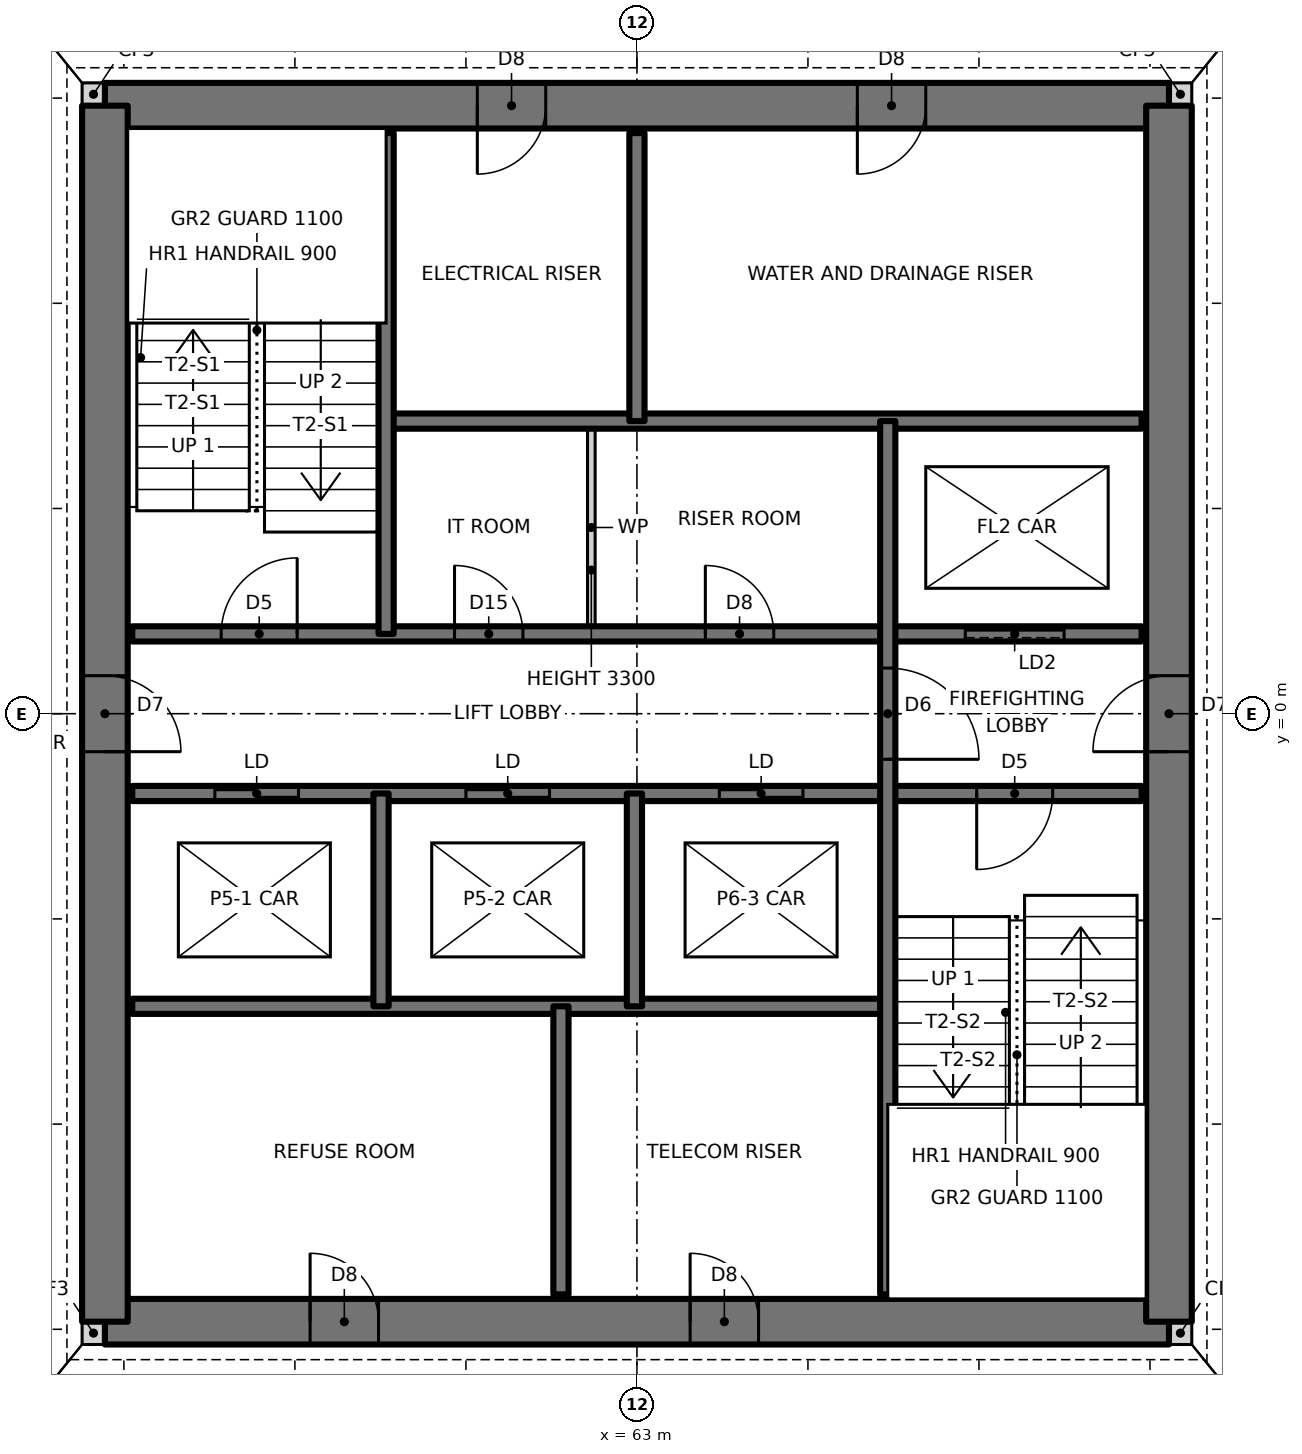
"""IFC4 building model, lengths in metres.
Left out: names, types, materials, properties, quantities, classifications, styles, units other than length and angle.
Written with IfcOpenShell. Run it as: python <this file> out.ifc"""

import sys

from ifc_helpers import new_model, si_unit, direction, frame, frame_2d, origin, place, context, subcontext, project, spatial, rectangle, extrude, element, fill, save


model = new_model("IFC4")
c1 = context("Model", 3, precision=1e-05, world=origin(), true_north=direction((0.0, 1.0)))
c2 = subcontext(c1, "Body", "Model", "MODEL_VIEW")
j1 = project(units=[si_unit("LENGTHUNIT", "METRE"), si_unit("PLANEANGLEUNIT", "RADIAN")], contexts=[c1])
p1 = place(None, origin())
s1 = spatial("IfcSite", under=j1, at=p1, CompositionType="ELEMENT")
p2 = place(p1, origin())
s2 = spatial("IfcBuilding", under=s1, at=p2, CompositionType="ELEMENT")
p3 = place(p2, frame((0.0, 0.0, 105.0)))
s3 = spatial("IfcBuildingStorey", under=s2, at=p3, CompositionType="ELEMENT", Elevation=105.0)
for number, where, z_axis, x_axis in (
    (1, (55.7, -8.15, 0.0), (0.0, 0.0, 1.0), (1.0, 0.0, 0.0)),
    (2, (70.0, -8.15, 0.0), (0.0, 0.0, 1.0), (1.0, 0.0, 0.0)),
    (3, (70.0, 8.15, 0.0), (0.0, 0.0, 1.0), (1.0, 0.0, 0.0)),
    (4, (55.7, 8.15, 0.0), (0.0, 0.0, 1.0), (1.0, 0.0, 0.0)),
):
    element("IfcWall", number, at=place(p3, frame(where, z_axis=z_axis, x_axis=x_axis)), inside=s3, PredefinedType="SOLIDWALL", context=c2, shape_type="SweptSolid", body=[
        extrude(rectangle(XDim=0.3, YDim=0.3, at=frame_2d((0.15, 0.0))), origin(), (0.0, 0.0, 1.0), 3.5),
    ])
p4 = place(p3, frame((56.0, -8.0, 0.0), z_axis=(0.0, 0.0, 1.0), x_axis=(1.0, 0.0, 0.0)))
e5 = element("IfcWall", 5, at=p4, inside=s3, PredefinedType="SHEAR", context=c2, shape_type="SweptSolid", body=[
    extrude(rectangle(XDim=14.0, YDim=0.6, at=frame_2d((7.0, 0.0))), origin(), (0.0, 0.0, 1.0), 3.5),
])
p5 = place(p4, frame((2.7, 0.0, 0.0)))
e6 = element("IfcOpeningElement", 6, at=p5, cuts=e5, PredefinedType="OPENING", context=c2, shape_type="SweptSolid", body=[
    extrude(rectangle(XDim=0.9, YDim=2.1, at=frame_2d((0.45, 1.05))), frame((0.0, 0.31, 0.0), z_axis=(0.0, -1.0, 0.0), x_axis=(1.0, 0.0, 0.0)), (0.0, 0.0, 1.0), 0.62),
])
p6 = place(p4, frame((7.7, 0.0, 0.0)))
e7 = element("IfcOpeningElement", 7, at=p6, cuts=e5, PredefinedType="OPENING", context=c2, shape_type="SweptSolid", body=[
    extrude(rectangle(XDim=0.9, YDim=2.1, at=frame_2d((0.45, 1.05))), frame((0.0, 0.31, 0.0), z_axis=(0.0, -1.0, 0.0), x_axis=(1.0, 0.0, 0.0)), (0.0, 0.0, 1.0), 0.62),
])
p7 = place(p3, frame((70.0, 8.0, 0.0), z_axis=(0.0, 0.0, 1.0), x_axis=(-1.0, 0.0, 0.0)))
e8 = element("IfcWall", 8, at=p7, inside=s3, PredefinedType="SHEAR", context=c2, shape_type="SweptSolid", body=[
    extrude(rectangle(XDim=14.0, YDim=0.6, at=frame_2d((7.0, 0.0))), origin(), (0.0, 0.0, 1.0), 3.5),
])
p8 = place(p7, frame((8.2, 0.0, 0.0)))
e9 = element("IfcOpeningElement", 9, at=p8, cuts=e8, PredefinedType="OPENING", context=c2, shape_type="SweptSolid", body=[
    extrude(rectangle(XDim=0.9, YDim=2.1, at=frame_2d((0.45, 1.05))), frame((0.0, 0.31, 0.0), z_axis=(0.0, -1.0, 0.0), x_axis=(1.0, 0.0, 0.0)), (0.0, 0.0, 1.0), 0.62),
])
p9 = place(p7, frame((3.2, 0.0, 0.0)))
e10 = element("IfcOpeningElement", 10, at=p9, cuts=e8, PredefinedType="OPENING", context=c2, shape_type="SweptSolid", body=[
    extrude(rectangle(XDim=0.9, YDim=2.1, at=frame_2d((0.45, 1.05))), frame((0.0, 0.31, 0.0), z_axis=(0.0, -1.0, 0.0), x_axis=(1.0, 0.0, 0.0)), (0.0, 0.0, 1.0), 0.62),
])
p10 = place(p3, frame((70.0, -8.0, 0.0), z_axis=(0.0, 0.0, 1.0), x_axis=(0.0, 1.0, 0.0)))
e11 = element("IfcWall", 11, at=p10, inside=s3, PredefinedType="SHEAR", context=c2, shape_type="SweptSolid", body=[
    extrude(rectangle(XDim=16.0, YDim=0.6, at=frame_2d((8.0, 0.0))), origin(), (0.0, 0.0, 1.0), 3.5),
])
p11 = place(p10, frame((7.5, 0.0, 0.0)))
e12 = element("IfcOpeningElement", 12, at=p11, cuts=e11, PredefinedType="OPENING", context=c2, shape_type="SweptSolid", body=[
    extrude(rectangle(XDim=1.0, YDim=2.1, at=frame_2d((0.5, 1.05))), frame((0.0, 0.31, 0.0), z_axis=(0.0, -1.0, 0.0), x_axis=(1.0, 0.0, 0.0)), (0.0, 0.0, 1.0), 0.62),
])
p12 = place(p3, frame((56.0, 8.0, 0.0), z_axis=(0.0, 0.0, 1.0), x_axis=(0.0, -1.0, 0.0)))
e13 = element("IfcWall", 13, at=p12, inside=s3, PredefinedType="SHEAR", context=c2, shape_type="SweptSolid", body=[
    extrude(rectangle(XDim=16.0, YDim=0.6, at=frame_2d((8.0, 0.0))), origin(), (0.0, 0.0, 1.0), 3.5),
])
p13 = place(p12, frame((7.5, 0.0, 0.0)))
e14 = element("IfcOpeningElement", 14, at=p13, cuts=e13, PredefinedType="OPENING", context=c2, shape_type="SweptSolid", body=[
    extrude(rectangle(XDim=1.0, YDim=2.1, at=frame_2d((0.5, 1.05))), frame((0.0, 0.31, 0.0), z_axis=(0.0, -1.0, 0.0), x_axis=(1.0, 0.0, 0.0)), (0.0, 0.0, 1.0), 0.62),
])
p14 = place(p3, frame((56.36, -3.85, 0.0), z_axis=(0.0, 0.0, 1.0), x_axis=(1.0, 0.0, 0.0)))
e15 = element("IfcWall", 15, at=p14, inside=s3, PredefinedType="SOLIDWALL", context=c2, shape_type="SweptSolid", body=[
    extrude(rectangle(XDim=9.94, YDim=0.2, at=frame_2d((4.97, 0.0))), origin(), (0.0, 0.0, 1.0), 3.5),
])
p15 = place(p3, frame((56.36, -1.05, 0.0), z_axis=(0.0, 0.0, 1.0), x_axis=(1.0, 0.0, 0.0)))
e16 = element("IfcWall", 16, at=p15, inside=s3, PredefinedType="SOLIDWALL", context=c2, shape_type="SweptSolid", body=[
    extrude(rectangle(XDim=13.28, YDim=0.2, at=frame_2d((6.64, 0.0))), origin(), (0.0, 0.0, 1.0), 3.5),
])
p16 = place(p15, frame((11.11, 0.0, 0.0)))
e17 = element("IfcOpeningElement", 17, at=p16, cuts=e16, PredefinedType="OPENING", context=c2, shape_type="SweptSolid", body=[
    extrude(rectangle(XDim=1.0, YDim=2.1, at=frame_2d((0.5, 1.05))), frame((0.0, 0.11, 0.0), z_axis=(0.0, -1.0, 0.0), x_axis=(1.0, 0.0, 0.0)), (0.0, 0.0, 1.0), 0.22),
])
p17 = place(p15, frame((1.087, 0.0, 0.0)))
e18 = element("IfcOpeningElement", 18, at=p17, cuts=e16, PredefinedType="OPENING", context=c2, shape_type="SweptSolid", body=[
    extrude(rectangle(XDim=1.1, YDim=2.1, at=frame_2d((0.55, 1.05))), frame((0.0, 0.11, 0.0), z_axis=(0.0, -1.0, 0.0), x_axis=(1.0, 0.0, 0.0)), (0.0, 0.0, 1.0), 0.22),
])
p18 = place(p15, frame((4.39, 0.0, 0.0)))
e19 = element("IfcOpeningElement", 19, at=p18, cuts=e16, PredefinedType="OPENING", context=c2, shape_type="SweptSolid", body=[
    extrude(rectangle(XDim=1.1, YDim=2.1, at=frame_2d((0.55, 1.05))), frame((0.0, 0.11, 0.0), z_axis=(0.0, -1.0, 0.0), x_axis=(1.0, 0.0, 0.0)), (0.0, 0.0, 1.0), 0.22),
])
p19 = place(p15, frame((7.724, 0.0, 0.0)))
e20 = element("IfcOpeningElement", 20, at=p19, cuts=e16, PredefinedType="OPENING", context=c2, shape_type="SweptSolid", body=[
    extrude(rectangle(XDim=1.1, YDim=2.1, at=frame_2d((0.55, 1.05))), frame((0.0, 0.11, 0.0), z_axis=(0.0, -1.0, 0.0), x_axis=(1.0, 0.0, 0.0)), (0.0, 0.0, 1.0), 0.22),
])
p20 = place(p3, frame((56.36, 1.05, 0.0), z_axis=(0.0, 0.0, 1.0), x_axis=(1.0, 0.0, 0.0)))
e21 = element("IfcWall", 21, at=p20, inside=s3, PredefinedType="SOLIDWALL", context=c2, shape_type="SweptSolid", body=[
    extrude(rectangle(XDim=13.28, YDim=0.2, at=frame_2d((6.64, 0.0))), origin(), (0.0, 0.0, 1.0), 3.5),
])
p21 = place(p20, frame((1.17, 0.0, 0.0)))
e22 = element("IfcOpeningElement", 22, at=p21, cuts=e21, PredefinedType="OPENING", context=c2, shape_type="SweptSolid", body=[
    extrude(rectangle(XDim=1.0, YDim=2.1, at=frame_2d((0.5, 1.05))), frame((0.0, 0.11, 0.0), z_axis=(0.0, -1.0, 0.0), x_axis=(1.0, 0.0, 0.0)), (0.0, 0.0, 1.0), 0.22),
])
p22 = place(p20, frame((7.54, 0.0, 0.0)))
e23 = element("IfcOpeningElement", 23, at=p22, cuts=e21, PredefinedType="OPENING", context=c2, shape_type="SweptSolid", body=[
    extrude(rectangle(XDim=0.9, YDim=2.1, at=frame_2d((0.45, 1.05))), frame((0.0, 0.11, 0.0), z_axis=(0.0, -1.0, 0.0), x_axis=(1.0, 0.0, 0.0)), (0.0, 0.0, 1.0), 0.22),
])
p23 = place(p20, frame((4.24, 0.0, 0.0)))
e24 = element("IfcOpeningElement", 24, at=p23, cuts=e21, PredefinedType="OPENING", context=c2, shape_type="SweptSolid", body=[
    extrude(rectangle(XDim=0.9, YDim=2.1, at=frame_2d((0.45, 1.05))), frame((0.0, 0.11, 0.0), z_axis=(0.0, -1.0, 0.0), x_axis=(1.0, 0.0, 0.0)), (0.0, 0.0, 1.0), 0.22),
])
p24 = place(p20, frame((10.96, 0.0, 0.0)))
e25 = element("IfcOpeningElement", 25, at=p24, cuts=e21, PredefinedType="OPENING", context=c2, shape_type="SweptSolid", body=[
    extrude(rectangle(XDim=1.3, YDim=2.1, at=frame_2d((0.65, 1.05))), frame((0.0, 0.11, 0.0), z_axis=(0.0, -1.0, 0.0), x_axis=(1.0, 0.0, 0.0)), (0.0, 0.0, 1.0), 0.22),
])
p25 = place(p3, frame((59.7, 3.85, 0.0), z_axis=(0.0, 0.0, 1.0), x_axis=(1.0, 0.0, 0.0)))
e26 = element("IfcWall", 26, at=p25, inside=s3, PredefinedType="SOLIDWALL", context=c2, shape_type="SweptSolid", body=[
    extrude(rectangle(XDim=9.94, YDim=0.2, at=frame_2d((4.97, 0.0))), origin(), (0.0, 0.0, 1.0), 3.5),
])
p26 = place(p3, frame((66.3, -7.64, 0.0), z_axis=(0.0, 0.0, 1.0), x_axis=(0.0, 1.0, 0.0)))
e27 = element("IfcWall", 27, at=p26, inside=s3, PredefinedType="SOLIDWALL", context=c2, shape_type="SweptSolid", body=[
    extrude(rectangle(XDim=11.49, YDim=0.2, at=frame_2d((5.745, 0.0))), origin(), (0.0, 0.0, 1.0), 3.5),
])
p27 = place(p26, frame((7.04, 0.0, 0.0)))
e28 = element("IfcOpeningElement", 28, at=p27, cuts=e27, PredefinedType="OPENING", context=c2, shape_type="SweptSolid", body=[
    extrude(rectangle(XDim=1.2, YDim=2.1, at=frame_2d((0.6, 1.05))), frame((0.0, 0.11, 0.0), z_axis=(0.0, -1.0, 0.0), x_axis=(1.0, 0.0, 0.0)), (0.0, 0.0, 1.0), 0.22),
])
p28 = place(p3, frame((63.0, 3.85, 0.0), z_axis=(0.0, 0.0, 1.0), x_axis=(0.0, 1.0, 0.0)))
e29 = element("IfcWall", 29, at=p28, inside=s3, PredefinedType="SOLIDWALL", context=c2, shape_type="SweptSolid", body=[
    extrude(rectangle(XDim=3.79, YDim=0.2, at=frame_2d((1.895, 0.0))), origin(), (0.0, 0.0, 1.0), 3.5),
])
p29 = place(p3, frame((62.967, -3.85, 0.0), z_axis=(0.0, 0.0, 1.0), x_axis=(0.0, 1.0, 0.0)))
e30 = element("IfcWall", 30, at=p29, inside=s3, PredefinedType="SOLIDWALL", context=c2, shape_type="SweptSolid", body=[
    extrude(rectangle(XDim=2.8, YDim=0.2, at=frame_2d((1.4, 0.0))), origin(), (0.0, 0.0, 1.0), 3.5),
])
p30 = place(p3, frame((62.4, 1.05, 0.0), z_axis=(0.0, 0.0, 1.0), x_axis=(0.0, 1.0, 0.0)))
e31 = element("IfcWall", 31, at=p30, inside=s3, PredefinedType="PARTITIONING", context=c2, shape_type="SweptSolid", body=[
    extrude(rectangle(XDim=2.8, YDim=0.1, at=frame_2d((1.4, 0.0))), origin(), (0.0, 0.0, 1.0), 3.3),
])
p31 = place(p3, frame((62.0, -7.64, 0.0), z_axis=(0.0, 0.0, 1.0), x_axis=(0.0, 1.0, 0.0)))
e32 = element("IfcWall", 32, at=p31, inside=s3, PredefinedType="SOLIDWALL", context=c2, shape_type="SweptSolid", body=[
    extrude(rectangle(XDim=3.79, YDim=0.2, at=frame_2d((1.895, 0.0))), origin(), (0.0, 0.0, 1.0), 3.5),
])
p32 = place(p3, frame((59.7, 1.05, 0.0), z_axis=(0.0, 0.0, 1.0), x_axis=(0.0, 1.0, 0.0)))
e33 = element("IfcWall", 33, at=p32, inside=s3, PredefinedType="SOLIDWALL", context=c2, shape_type="SweptSolid", body=[
    extrude(rectangle(XDim=6.59, YDim=0.2, at=frame_2d((3.295, 0.0))), origin(), (0.0, 0.0, 1.0), 3.5),
])
p33 = place(p3, frame((59.633, -3.85, 0.0), z_axis=(0.0, 0.0, 1.0), x_axis=(0.0, 1.0, 0.0)))
e34 = element("IfcWall", 34, at=p33, inside=s3, PredefinedType="SOLIDWALL", context=c2, shape_type="SweptSolid", body=[
    extrude(rectangle(XDim=2.8, YDim=0.2, at=frame_2d((1.4, 0.0))), origin(), (0.0, 0.0, 1.0), 3.5),
])
p34 = place(p21, origin())
e35 = element("IfcDoor", 35, at=p34, inside=s3, OperationType="SINGLE_SWING_RIGHT", PredefinedType="DOOR", context=c2, shape_type="SweptSolid", body=[
    extrude(rectangle(XDim=1.0, YDim=2.1, at=frame_2d((0.5, 1.05))), frame((0.0, 0.025, 0.0), z_axis=(0.0, -1.0, 0.0), x_axis=(1.0, 0.0, 0.0)), (0.0, 0.0, 1.0), 0.05),
])
fill(e22, e35)
p35 = place(p16, frame((1.0, 0.0, 0.0), z_axis=(0.0, 0.0, 1.0), x_axis=(-1.0, 0.0, 0.0)))
e36 = element("IfcDoor", 36, at=p35, inside=s3, OperationType="SINGLE_SWING_RIGHT", PredefinedType="DOOR", context=c2, shape_type="SweptSolid", body=[
    extrude(rectangle(XDim=1.0, YDim=2.1, at=frame_2d((0.5, 1.05))), frame((0.0, 0.025, 0.0), z_axis=(0.0, -1.0, 0.0), x_axis=(1.0, 0.0, 0.0)), (0.0, 0.0, 1.0), 0.05),
])
fill(e17, e36)
p36 = place(p27, frame((1.2, 0.0, 0.0), z_axis=(0.0, 0.0, 1.0), x_axis=(-1.0, 0.0, 0.0)))
e37 = element("IfcDoor", 37, at=p36, inside=s3, OperationType="SINGLE_SWING_RIGHT", PredefinedType="DOOR", context=c2, shape_type="SweptSolid", body=[
    extrude(rectangle(XDim=1.2, YDim=2.1, at=frame_2d((0.6, 1.05))), frame((0.0, 0.025, 0.0), z_axis=(0.0, -1.0, 0.0), x_axis=(1.0, 0.0, 0.0)), (0.0, 0.0, 1.0), 0.05),
])
fill(e28, e37)
p37 = place(p22, origin())
e38 = element("IfcDoor", 38, at=p37, inside=s3, OperationType="SINGLE_SWING_LEFT", PredefinedType="DOOR", context=c2, shape_type="SweptSolid", body=[
    extrude(rectangle(XDim=0.9, YDim=2.1, at=frame_2d((0.45, 1.05))), frame((0.0, 0.025, 0.0), z_axis=(0.0, -1.0, 0.0), x_axis=(1.0, 0.0, 0.0)), (0.0, 0.0, 1.0), 0.05),
])
fill(e23, e38)
p38 = place(p23, origin())
e39 = element("IfcDoor", 39, at=p38, inside=s3, OperationType="SINGLE_SWING_LEFT", PredefinedType="DOOR", context=c2, shape_type="SweptSolid", body=[
    extrude(rectangle(XDim=0.9, YDim=2.1, at=frame_2d((0.45, 1.05))), frame((0.0, 0.025, 0.0), z_axis=(0.0, -1.0, 0.0), x_axis=(1.0, 0.0, 0.0)), (0.0, 0.0, 1.0), 0.05),
])
fill(e24, e39)
p39 = place(p13, origin())
e40 = element("IfcDoor", 40, at=p39, inside=s3, OperationType="SINGLE_SWING_RIGHT", PredefinedType="DOOR", context=c2, shape_type="SweptSolid", body=[
    extrude(rectangle(XDim=1.0, YDim=2.1, at=frame_2d((0.5, 1.05))), frame((0.0, 0.025, 0.0), z_axis=(0.0, -1.0, 0.0), x_axis=(1.0, 0.0, 0.0)), (0.0, 0.0, 1.0), 0.05),
])
fill(e14, e40)
p40 = place(p11, origin())
e41 = element("IfcDoor", 41, at=p40, inside=s3, OperationType="SINGLE_SWING_LEFT", PredefinedType="DOOR", context=c2, shape_type="SweptSolid", body=[
    extrude(rectangle(XDim=1.0, YDim=2.1, at=frame_2d((0.5, 1.05))), frame((0.0, 0.025, 0.0), z_axis=(0.0, -1.0, 0.0), x_axis=(1.0, 0.0, 0.0)), (0.0, 0.0, 1.0), 0.05),
])
fill(e12, e41)
p41 = place(p8, origin())
e42 = element("IfcDoor", 42, at=p41, inside=s3, OperationType="SINGLE_SWING_RIGHT", PredefinedType="DOOR", context=c2, shape_type="SweptSolid", body=[
    extrude(rectangle(XDim=0.9, YDim=2.1, at=frame_2d((0.45, 1.05))), frame((0.0, 0.025, 0.0), z_axis=(0.0, -1.0, 0.0), x_axis=(1.0, 0.0, 0.0)), (0.0, 0.0, 1.0), 0.05),
])
fill(e9, e42)
p42 = place(p9, origin())
e43 = element("IfcDoor", 43, at=p42, inside=s3, OperationType="SINGLE_SWING_RIGHT", PredefinedType="DOOR", context=c2, shape_type="SweptSolid", body=[
    extrude(rectangle(XDim=0.9, YDim=2.1, at=frame_2d((0.45, 1.05))), frame((0.0, 0.025, 0.0), z_axis=(0.0, -1.0, 0.0), x_axis=(1.0, 0.0, 0.0)), (0.0, 0.0, 1.0), 0.05),
])
fill(e10, e43)
p43 = place(p5, origin())
e44 = element("IfcDoor", 44, at=p43, inside=s3, OperationType="SINGLE_SWING_LEFT", PredefinedType="DOOR", context=c2, shape_type="SweptSolid", body=[
    extrude(rectangle(XDim=0.9, YDim=2.1, at=frame_2d((0.45, 1.05))), frame((0.0, 0.025, 0.0), z_axis=(0.0, -1.0, 0.0), x_axis=(1.0, 0.0, 0.0)), (0.0, 0.0, 1.0), 0.05),
])
fill(e6, e44)
p44 = place(p6, origin())
e45 = element("IfcDoor", 45, at=p44, inside=s3, OperationType="SINGLE_SWING_LEFT", PredefinedType="DOOR", context=c2, shape_type="SweptSolid", body=[
    extrude(rectangle(XDim=0.9, YDim=2.1, at=frame_2d((0.45, 1.05))), frame((0.0, 0.025, 0.0), z_axis=(0.0, -1.0, 0.0), x_axis=(1.0, 0.0, 0.0)), (0.0, 0.0, 1.0), 0.05),
])
fill(e7, e45)
p45 = place(p17, origin())
e46 = element("IfcDoor", 46, at=p45, inside=s3, OperationType="DOUBLE_DOOR_SLIDING", PredefinedType="DOOR", context=c2, shape_type="SweptSolid", body=[
    extrude(rectangle(XDim=1.1, YDim=2.1, at=frame_2d((0.55, 1.05))), frame((0.0, 0.025, 0.0), z_axis=(0.0, -1.0, 0.0), x_axis=(1.0, 0.0, 0.0)), (0.0, 0.0, 1.0), 0.05),
])
fill(e18, e46)
p46 = place(p18, origin())
e47 = element("IfcDoor", 47, at=p46, inside=s3, OperationType="DOUBLE_DOOR_SLIDING", PredefinedType="DOOR", context=c2, shape_type="SweptSolid", body=[
    extrude(rectangle(XDim=1.1, YDim=2.1, at=frame_2d((0.55, 1.05))), frame((0.0, 0.025, 0.0), z_axis=(0.0, -1.0, 0.0), x_axis=(1.0, 0.0, 0.0)), (0.0, 0.0, 1.0), 0.05),
])
fill(e19, e47)
p47 = place(p19, origin())
e48 = element("IfcDoor", 48, at=p47, inside=s3, OperationType="DOUBLE_DOOR_SLIDING", PredefinedType="DOOR", context=c2, shape_type="SweptSolid", body=[
    extrude(rectangle(XDim=1.1, YDim=2.1, at=frame_2d((0.55, 1.05))), frame((0.0, 0.025, 0.0), z_axis=(0.0, -1.0, 0.0), x_axis=(1.0, 0.0, 0.0)), (0.0, 0.0, 1.0), 0.05),
])
fill(e20, e48)
p48 = place(p24, origin())
e49 = element("IfcDoor", 49, at=p48, inside=s3, OperationType="SLIDING_TO_LEFT", PredefinedType="DOOR", context=c2, shape_type="SweptSolid", body=[
    extrude(rectangle(XDim=1.3, YDim=2.1, at=frame_2d((0.65, 1.05))), frame((0.0, 0.025, 0.0), z_axis=(0.0, -1.0, 0.0), x_axis=(1.0, 0.0, 0.0)), (0.0, 0.0, 1.0), 0.05),
])
fill(e25, e49)
save(model, sys.argv[1])
